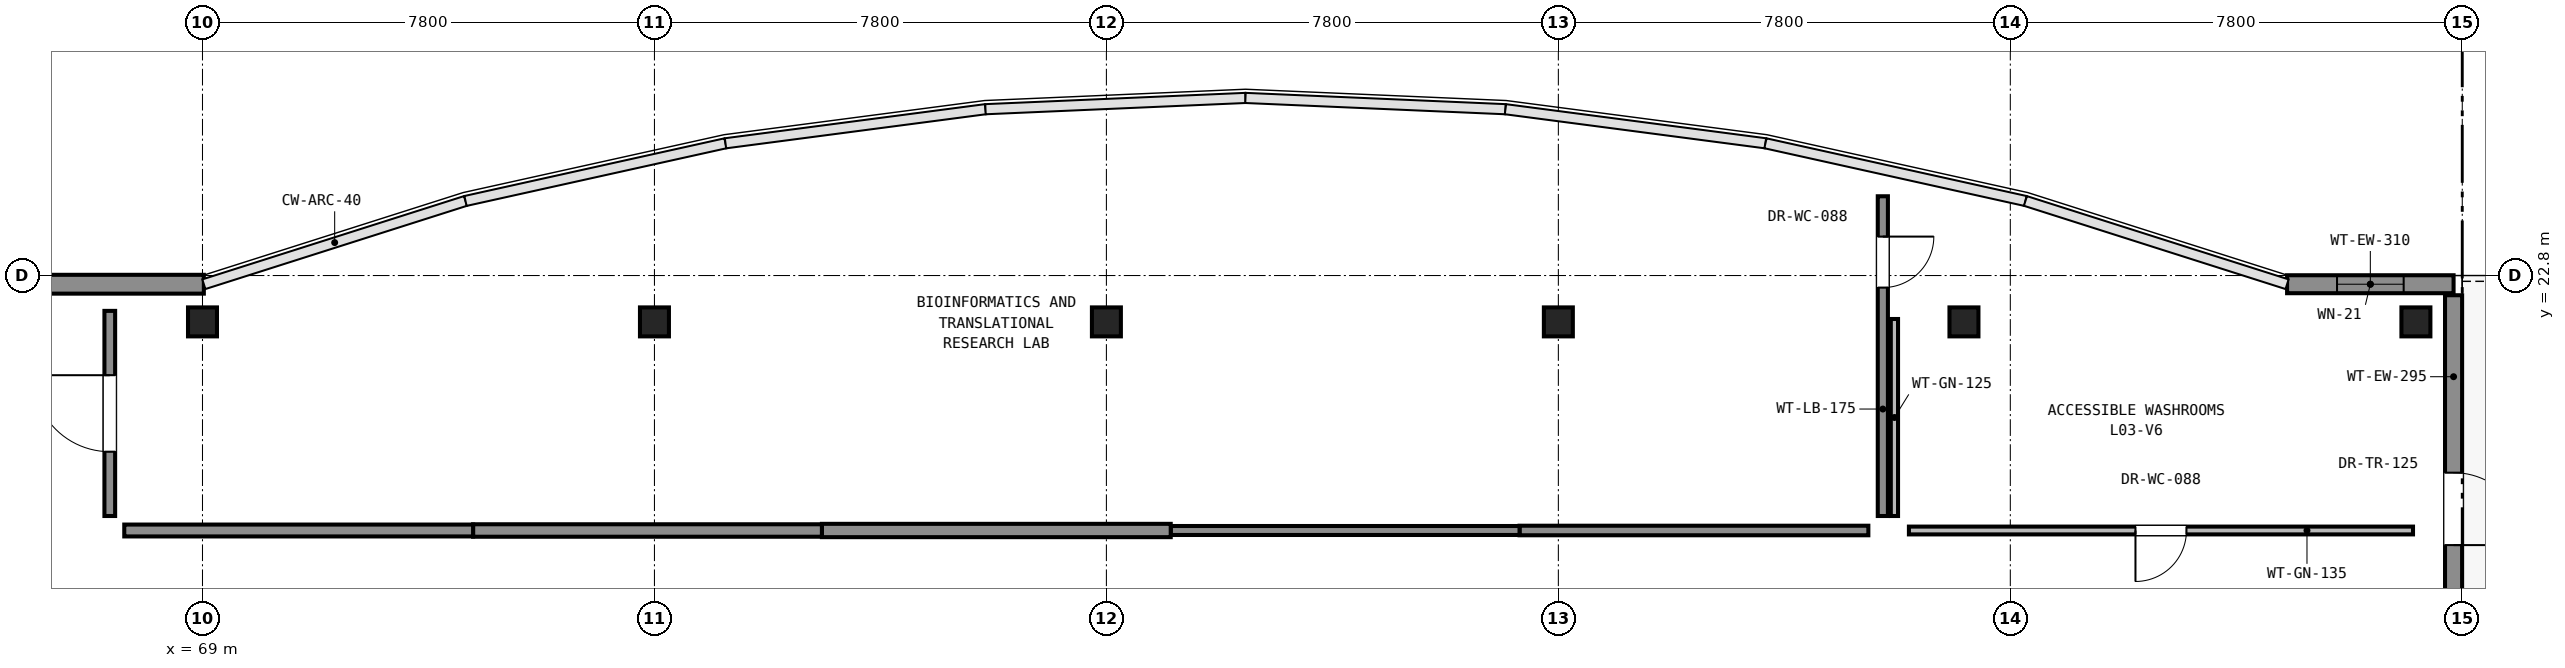
"""IFC4 building model, lengths in metres.
Left out: names, types, materials, properties, quantities, classifications, styles, units other than length and angle.
Written with IfcOpenShell. Run it as: python <this file> out.ifc"""

import sys

from ifc_helpers import new_model, si_unit, direction, frame, frame_2d, origin, origin_2d, place, context, subcontext, project, spatial, rectangle, extrude, element, fill, save


model = new_model("IFC4")
c1 = context("Model", 3, precision=1e-05, world=origin(), true_north=direction((0.0, 1.0)))
c2 = subcontext(c1, "Body", "Model", "MODEL_VIEW")
j1 = project(units=[si_unit("LENGTHUNIT", "METRE"), si_unit("PLANEANGLEUNIT", "RADIAN")], contexts=[c1])
p1 = place(None, origin())
s1 = spatial("IfcSite", under=j1, at=p1, CompositionType="ELEMENT")
p2 = place(p1, origin())
s2 = spatial("IfcBuilding", under=s1, at=p2, CompositionType="ELEMENT")
p3 = place(p2, frame((0.0, 0.0, 13.6)))
s3 = spatial("IfcBuildingStorey", under=s2, at=p3, CompositionType="ELEMENT", Elevation=13.6)
for number, where, z_axis, x_axis in (
    (1, (69.0, 22.0, 0.0), (0.0, 0.0, 1.0), (1.0, 0.0, 0.0)),
    (2, (76.8, 22.0, 0.0), (0.0, 0.0, 1.0), (1.0, 0.0, 0.0)),
    (3, (84.6, 22.0, 0.0), (0.0, 0.0, 1.0), (1.0, 0.0, 0.0)),
    (4, (92.4, 22.0, 0.0), (0.0, 0.0, 1.0), (1.0, 0.0, 0.0)),
    (5, (99.4, 22.0, 0.0), (0.0, 0.0, 1.0), (1.0, 0.0, 0.0)),
    (6, (107.2, 22.0, 0.0), (0.0, 0.0, 1.0), (1.0, 0.0, 0.0)),
):
    element("IfcColumn", number, at=place(p3, frame(where, z_axis=z_axis, x_axis=x_axis)), inside=s3, PredefinedType="COLUMN", context=c2, shape_type="SweptSolid", body=[
        extrude(rectangle(XDim=0.5, YDim=0.5, at=origin_2d()), origin(), (0.0, 0.0, 1.0), 4.08),
    ])
p4 = place(p3, frame((61.337, 22.65, 0.0), z_axis=(0.0, 0.0, 1.0), x_axis=(1.0, 0.0, 0.0)))
e7 = element("IfcWall", 7, at=p4, inside=s3, PredefinedType="SOLIDWALL", context=c2, shape_type="SweptSolid", body=[
    extrude(rectangle(XDim=7.687, YDim=0.325, at=frame_2d((3.843, 0.0))), origin(), (0.0, 0.0, 1.0), 3.78),
])
p5 = place(p4, frame((2.643, 0.0, 0.9)))
e8 = element("IfcOpeningElement", 8, at=p5, cuts=e7, PredefinedType="OPENING", context=c2, shape_type="SweptSolid", body=[
    extrude(rectangle(XDim=2.4, YDim=1.75, at=frame_2d((1.2, 0.875))), frame((0.0, 0.172, 0.0), z_axis=(0.0, -1.0, 0.0), x_axis=(1.0, 0.0, 0.0)), (0.0, 0.0, 1.0), 0.345),
])
p6 = place(p3, frame((104.977, 22.65, 0.0), z_axis=(0.0, 0.0, 1.0), x_axis=(1.0, 0.0, 0.0)))
e9 = element("IfcWall", 9, at=p6, inside=s3, PredefinedType="SOLIDWALL", context=c2, shape_type="SweptSolid", body=[
    extrude(rectangle(XDim=2.873, YDim=0.31, at=frame_2d((1.437, 0.0))), origin(), (0.0, 0.0, 1.0), 3.78),
])
p7 = place(p6, frame((0.862, 0.0, 0.9)))
e10 = element("IfcOpeningElement", 10, at=p7, cuts=e9, PredefinedType="OPENING", context=c2, shape_type="SweptSolid", body=[
    extrude(rectangle(XDim=1.15, YDim=2.0, at=frame_2d((0.575, 1.0))), frame((0.0, 0.165, 0.0), z_axis=(0.0, -1.0, 0.0), x_axis=(1.0, 0.0, 0.0)), (0.0, 0.0, 1.0), 0.33),
])
p8 = place(p3, frame((107.85, 22.46, 0.0), z_axis=(0.0, 0.0, 1.0), x_axis=(0.0, -1.0, 0.0)))
e11 = element("IfcWall", 11, at=p8, inside=s3, PredefinedType="SOLIDWALL", context=c2, shape_type="SweptSolid", body=[
    extrude(rectangle(XDim=7.373, YDim=0.295, at=frame_2d((3.687, 0.0))), origin(), (0.0, 0.0, 1.0), 3.78),
])
p9 = place(p8, frame((3.062, 0.0, 0.0)))
e12 = element("IfcOpeningElement", 12, at=p9, cuts=e11, PredefinedType="OPENING", context=c2, shape_type="SweptSolid", body=[
    extrude(rectangle(XDim=1.25, YDim=2.15, at=frame_2d((0.625, 1.075))), frame((0.0, 0.157, 0.0), z_axis=(0.0, -1.0, 0.0), x_axis=(1.0, 0.0, 0.0)), (0.0, 0.0, 1.0), 0.315),
])
p10 = place(p3, frame((67.4, 18.65, 0.0), z_axis=(0.0, 0.0, 1.0), x_axis=(0.0, 1.0, 0.0)))
e13 = element("IfcWall", 13, at=p10, inside=s3, PredefinedType="PARTITIONING", context=c2, shape_type="SweptSolid", body=[
    extrude(rectangle(XDim=3.54, YDim=0.185, at=frame_2d((1.77, 0.0))), origin(), (0.0, 0.0, 1.0), 2.98),
])
p11 = place(p10, frame((1.11, 0.0, 0.0)))
e14 = element("IfcOpeningElement", 14, at=p11, cuts=e13, PredefinedType="OPENING", context=c2, shape_type="SweptSolid", body=[
    extrude(rectangle(XDim=1.32, YDim=2.2, at=frame_2d((0.66, 1.1))), frame((0.0, 0.103, 0.0), z_axis=(0.0, -1.0, 0.0), x_axis=(1.0, 0.0, 0.0)), (0.0, 0.0, 1.0), 0.205),
])
p12 = place(p3, frame((98.0, 24.168, 0.0), z_axis=(0.0, 0.0, 1.0), x_axis=(0.0, -1.0, 0.0)))
e15 = element("IfcWall", 15, at=p12, inside=s3, PredefinedType="PARTITIONING", context=c2, shape_type="SweptSolid", body=[
    extrude(rectangle(XDim=5.518, YDim=0.175, at=frame_2d((2.759, 0.0))), origin(), (0.0, 0.0, 1.0), 3.08),
])
p13 = place(p12, frame((0.696, 0.0, 0.0)))
e16 = element("IfcOpeningElement", 16, at=p13, cuts=e15, PredefinedType="OPENING", context=c2, shape_type="SweptSolid", body=[
    extrude(rectangle(XDim=0.88, YDim=2.1, at=frame_2d((0.44, 1.05))), frame((0.0, 0.097, 0.0), z_axis=(0.0, -1.0, 0.0), x_axis=(1.0, 0.0, 0.0)), (0.0, 0.0, 1.0), 0.195),
])
p14 = place(p3, frame((97.75, 18.4, 0.0), z_axis=(0.0, 0.0, 1.0), x_axis=(-1.0, 0.0, 0.0)))
e17 = element("IfcWall", 17, at=p14, inside=s3, PredefinedType="PARTITIONING", context=c2, shape_type="SweptSolid", body=[
    extrude(rectangle(XDim=6.02, YDim=0.165, at=frame_2d((3.01, 0.0))), origin(), (0.0, 0.0, 1.0), 3.03),
])
p15 = place(p3, frame((91.73, 18.4, 0.0), z_axis=(0.0, 0.0, 1.0), x_axis=(-1.0, 0.0, 0.0)))
e18 = element("IfcWall", 18, at=p15, inside=s3, PredefinedType="PARTITIONING", context=c2, shape_type="SweptSolid", body=[
    extrude(rectangle(XDim=6.02, YDim=0.155, at=frame_2d((3.01, 0.0))), origin(), (0.0, 0.0, 1.0), 3.78),
])
p16 = place(p3, frame((85.71, 18.4, 0.0), z_axis=(0.0, 0.0, 1.0), x_axis=(-1.0, 0.0, 0.0)))
e19 = element("IfcWall", 19, at=p16, inside=s3, PredefinedType="PARTITIONING", context=c2, shape_type="SweptSolid", body=[
    extrude(rectangle(XDim=6.02, YDim=0.23, at=frame_2d((3.01, 0.0))), origin(), (0.0, 0.0, 1.0), 3.13),
])
p17 = place(p3, frame((79.69, 18.4, 0.0), z_axis=(0.0, 0.0, 1.0), x_axis=(-1.0, 0.0, 0.0)))
e20 = element("IfcWall", 20, at=p17, inside=s3, PredefinedType="PARTITIONING", context=c2, shape_type="SweptSolid", body=[
    extrude(rectangle(XDim=6.02, YDim=0.215, at=frame_2d((3.01, 0.0))), origin(), (0.0, 0.0, 1.0), 2.98),
])
p18 = place(p3, frame((73.67, 18.4, 0.0), z_axis=(0.0, 0.0, 1.0), x_axis=(-1.0, 0.0, 0.0)))
e21 = element("IfcWall", 21, at=p18, inside=s3, PredefinedType="PARTITIONING", context=c2, shape_type="SweptSolid", body=[
    extrude(rectangle(XDim=6.02, YDim=0.205, at=frame_2d((3.01, 0.0))), origin(), (0.0, 0.0, 1.0), 3.13),
])
p19 = place(p3, frame((107.15, 18.4, 0.0), z_axis=(0.0, 0.0, 1.0), x_axis=(-1.0, 0.0, 0.0)))
e22 = element("IfcWall", 22, at=p19, inside=s3, PredefinedType="PARTITIONING", context=c2, shape_type="SweptSolid", body=[
    extrude(rectangle(XDim=8.7, YDim=0.135, at=frame_2d((4.35, 0.0))), origin(), (0.0, 0.0, 1.0), 3.08),
])
p20 = place(p19, frame((3.91, 0.0, 0.0)))
e23 = element("IfcOpeningElement", 23, at=p20, cuts=e22, PredefinedType="OPENING", context=c2, shape_type="SweptSolid", body=[
    extrude(rectangle(XDim=0.88, YDim=2.1, at=frame_2d((0.44, 1.05))), frame((0.0, 0.077, 0.0), z_axis=(0.0, -1.0, 0.0), x_axis=(1.0, 0.0, 0.0)), (0.0, 0.0, 1.0), 0.155),
])
p21 = place(p3, frame((98.2, 18.65, 0.0), z_axis=(0.0, 0.0, 1.0), x_axis=(0.0, 1.0, 0.0)))
e24 = element("IfcWall", 24, at=p21, inside=s3, PredefinedType="PARTITIONING", context=c2, shape_type="SweptSolid", body=[
    extrude(rectangle(XDim=3.4, YDim=0.125, at=frame_2d((1.7, 0.0))), origin(), (0.0, 0.0, 1.0), 3.08),
])
p22 = place(p7, origin())
e25 = element("IfcWindow", 25, at=p22, inside=s3, PartitioningType="SINGLE_PANEL", PredefinedType="WINDOW", context=c2, shape_type="SweptSolid", body=[
    extrude(rectangle(XDim=1.15, YDim=2.0, at=frame_2d((0.575, 1.0))), frame((0.0, 0.03, 0.0), z_axis=(0.0, -1.0, 0.0), x_axis=(1.0, 0.0, 0.0)), (0.0, 0.0, 1.0), 0.06),
])
fill(e10, e25)
p23 = place(p9, origin())
e26 = element("IfcDoor", 26, at=p23, inside=s3, OperationType="SINGLE_SWING_RIGHT", PredefinedType="DOOR", context=c2, shape_type="SweptSolid", body=[
    extrude(rectangle(XDim=1.25, YDim=2.15, at=frame_2d((0.625, 1.075))), frame((0.0, 0.025, 0.0), z_axis=(0.0, -1.0, 0.0), x_axis=(1.0, 0.0, 0.0)), (0.0, 0.0, 1.0), 0.05),
])
fill(e12, e26)
p24 = place(p11, origin())
e27 = element("IfcDoor", 27, at=p24, inside=s3, OperationType="SINGLE_SWING_RIGHT", PredefinedType="DOOR", context=c2, shape_type="SweptSolid", body=[
    extrude(rectangle(XDim=1.32, YDim=2.2, at=frame_2d((0.66, 1.1))), frame((0.0, 0.025, 0.0), z_axis=(0.0, -1.0, 0.0), x_axis=(1.0, 0.0, 0.0)), (0.0, 0.0, 1.0), 0.05),
])
fill(e14, e27)
p25 = place(p13, origin())
e28 = element("IfcDoor", 28, at=p25, inside=s3, OperationType="SINGLE_SWING_LEFT", PredefinedType="DOOR", context=c2, shape_type="SweptSolid", body=[
    extrude(rectangle(XDim=0.88, YDim=2.1, at=frame_2d((0.44, 1.05))), frame((0.0, 0.025, 0.0), z_axis=(0.0, -1.0, 0.0), x_axis=(1.0, 0.0, 0.0)), (0.0, 0.0, 1.0), 0.05),
])
fill(e16, e28)
p26 = place(p20, origin())
e29 = element("IfcDoor", 29, at=p26, inside=s3, OperationType="SINGLE_SWING_RIGHT", PredefinedType="DOOR", context=c2, shape_type="SweptSolid", body=[
    extrude(rectangle(XDim=0.88, YDim=2.1, at=frame_2d((0.44, 1.05))), frame((0.0, 0.025, 0.0), z_axis=(0.0, -1.0, 0.0), x_axis=(1.0, 0.0, 0.0)), (0.0, 0.0, 1.0), 0.05),
])
fill(e23, e29)
save(model, sys.argv[1])
